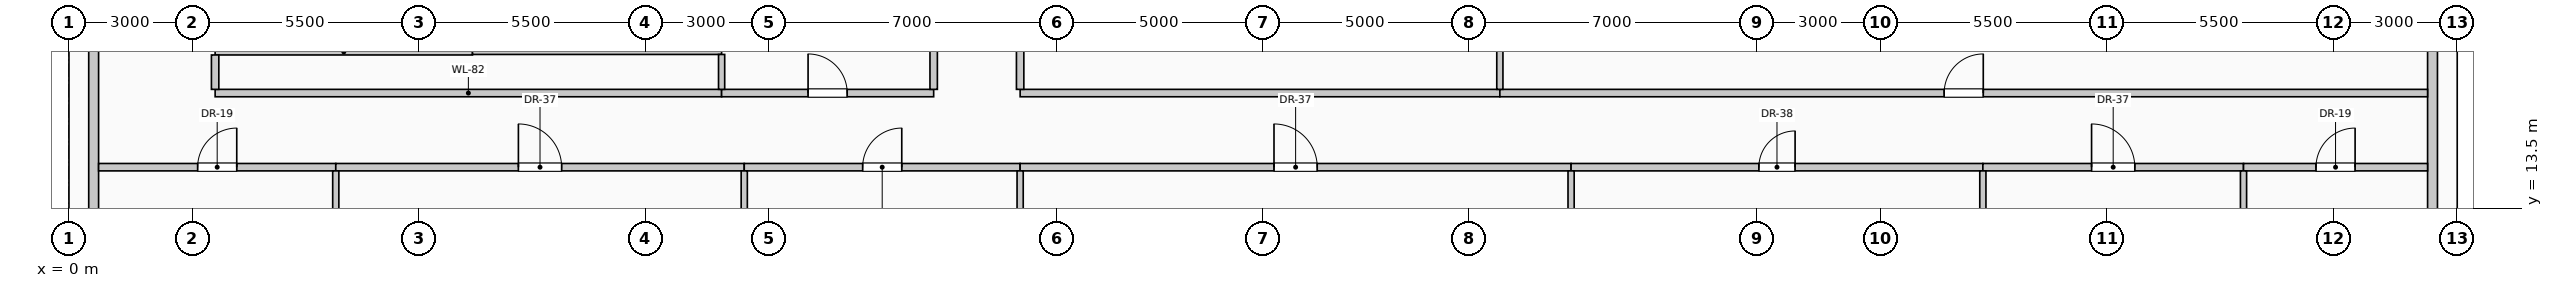
"""IFC4 building model, lengths in metres.
Left out: names, types, materials, properties, quantities, classifications, styles, units other than length and angle.
Written with IfcOpenShell. Run it as: python <this file> out.ifc"""

import sys

from ifc_helpers import new_model, si_unit, direction, frame, frame_2d, origin, place, context, subcontext, project, spatial, rectangle, extrude, element, fill, save


model = new_model("IFC4")
c1 = context("Model", 3, precision=1e-05, world=origin(), true_north=direction((0.0, 1.0)))
c2 = subcontext(c1, "Body", "Model", "MODEL_VIEW")
j1 = project(units=[si_unit("LENGTHUNIT", "METRE"), si_unit("PLANEANGLEUNIT", "RADIAN")], contexts=[c1])
p1 = place(None, origin())
s1 = spatial("IfcSite", under=j1, at=p1, CompositionType="ELEMENT")
p2 = place(p1, origin())
s2 = spatial("IfcBuilding", under=s1, at=p2, CompositionType="ELEMENT")
p3 = place(p2, frame((0.0, 0.0, 202.6)))
s3 = spatial("IfcBuildingStorey", under=s2, at=p3, CompositionType="ELEMENT", Elevation=202.6)
p4 = place(p3, frame((0.6, 10.42, 0.0), z_axis=(0.0, 0.0, 1.0), x_axis=(0.0, 1.0, 0.0)))
e1 = element("IfcWall", 1, at=p4, inside=s3, PredefinedType="SOLIDWALL", context=c2, shape_type="SweptSolid", body=[
    extrude(rectangle(XDim=7.16, YDim=0.24, at=frame_2d((3.58, 0.0))), origin(), (0.0, 0.0, 1.0), 3.0),
])
p5 = place(p4, frame((1.387, 0.0, 0.42)))
e2 = element("IfcOpeningElement", 2, at=p5, cuts=e1, PredefinedType="OPENING", context=c2, shape_type="SweptSolid", body=[
    extrude(rectangle(XDim=1.5, YDim=2.2, at=frame_2d((0.75, 1.1))), frame((0.0, 0.13, 0.0), z_axis=(0.0, -1.0, 0.0), x_axis=(1.0, 0.0, 0.0)), (0.0, 0.0, 1.0), 0.26),
])
p6 = place(p3, frame((57.4, 17.58, 0.0), z_axis=(0.0, 0.0, 1.0), x_axis=(0.0, -1.0, 0.0)))
e3 = element("IfcWall", 3, at=p6, inside=s3, PredefinedType="SOLIDWALL", context=c2, shape_type="SweptSolid", body=[
    extrude(rectangle(XDim=7.16, YDim=0.24, at=frame_2d((3.58, 0.0))), origin(), (0.0, 0.0, 1.0), 3.0),
])
p7 = place(p6, frame((4.273, 0.0, 0.42)))
e4 = element("IfcOpeningElement", 4, at=p7, cuts=e3, PredefinedType="OPENING", context=c2, shape_type="SweptSolid", body=[
    extrude(rectangle(XDim=1.5, YDim=2.2, at=frame_2d((0.75, 1.1))), frame((0.0, 0.13, 0.0), z_axis=(0.0, -1.0, 0.0), x_axis=(1.0, 0.0, 0.0)), (0.0, 0.0, 1.0), 0.26),
])
p8 = place(p3, frame((0.72, 14.5, 0.0), z_axis=(0.0, 0.0, 1.0), x_axis=(1.0, 0.0, 0.0)))
e5 = element("IfcWall", 5, at=p8, inside=s3, PredefinedType="PARTITIONING", context=c2, shape_type="SweptSolid", body=[
    extrude(rectangle(XDim=5.76, YDim=0.18, at=frame_2d((2.88, 0.0))), origin(), (0.0, 0.0, 1.0), 3.75),
])
p9 = place(p8, frame((2.405, 0.0, 0.0)))
e6 = element("IfcOpeningElement", 6, at=p9, cuts=e5, PredefinedType="OPENING", context=c2, shape_type="SweptSolid", body=[
    extrude(rectangle(XDim=0.95, YDim=2.15, at=frame_2d((0.475, 1.075))), frame((0.0, 0.1, 0.0), z_axis=(0.0, -1.0, 0.0), x_axis=(1.0, 0.0, 0.0)), (0.0, 0.0, 1.0), 0.2),
])
p10 = place(p3, frame((6.48, 14.5, 0.0), z_axis=(0.0, 0.0, 1.0), x_axis=(1.0, 0.0, 0.0)))
e7 = element("IfcWall", 7, at=p10, inside=s3, PredefinedType="PARTITIONING", context=c2, shape_type="SweptSolid", body=[
    extrude(rectangle(XDim=9.92, YDim=0.18, at=frame_2d((4.96, 0.0))), origin(), (0.0, 0.0, 1.0), 3.75),
])
p11 = place(p10, frame((4.435, 0.0, 0.0)))
e8 = element("IfcOpeningElement", 8, at=p11, cuts=e7, PredefinedType="OPENING", context=c2, shape_type="SweptSolid", body=[
    extrude(rectangle(XDim=1.05, YDim=2.15, at=frame_2d((0.525, 1.075))), frame((0.0, 0.1, 0.0), z_axis=(0.0, -1.0, 0.0), x_axis=(1.0, 0.0, 0.0)), (0.0, 0.0, 1.0), 0.2),
])
p12 = place(p3, frame((16.4, 14.5, 0.0), z_axis=(0.0, 0.0, 1.0), x_axis=(1.0, 0.0, 0.0)))
e9 = element("IfcWall", 9, at=p12, inside=s3, PredefinedType="PARTITIONING", context=c2, shape_type="SweptSolid", body=[
    extrude(rectangle(XDim=6.7, YDim=0.18, at=frame_2d((3.35, 0.0))), origin(), (0.0, 0.0, 1.0), 3.75),
])
p13 = place(p12, frame((2.875, 0.0, 0.0)))
e10 = element("IfcOpeningElement", 10, at=p13, cuts=e9, PredefinedType="OPENING", context=c2, shape_type="SweptSolid", body=[
    extrude(rectangle(XDim=0.95, YDim=2.15, at=frame_2d((0.475, 1.075))), frame((0.0, 0.1, 0.0), z_axis=(0.0, -1.0, 0.0), x_axis=(1.0, 0.0, 0.0)), (0.0, 0.0, 1.0), 0.2),
])
p14 = place(p3, frame((23.1, 14.5, 0.0), z_axis=(0.0, 0.0, 1.0), x_axis=(1.0, 0.0, 0.0)))
e11 = element("IfcWall", 11, at=p14, inside=s3, PredefinedType="PARTITIONING", context=c2, shape_type="SweptSolid", body=[
    extrude(rectangle(XDim=13.38, YDim=0.18, at=frame_2d((6.69, 0.0))), origin(), (0.0, 0.0, 1.0), 3.75),
])
p15 = place(p14, frame((6.165, 0.0, 0.0)))
e12 = element("IfcOpeningElement", 12, at=p15, cuts=e11, PredefinedType="OPENING", context=c2, shape_type="SweptSolid", body=[
    extrude(rectangle(XDim=1.05, YDim=2.15, at=frame_2d((0.525, 1.075))), frame((0.0, 0.1, 0.0), z_axis=(0.0, -1.0, 0.0), x_axis=(1.0, 0.0, 0.0)), (0.0, 0.0, 1.0), 0.2),
])
p16 = place(p3, frame((36.48, 14.5, 0.0), z_axis=(0.0, 0.0, 1.0), x_axis=(1.0, 0.0, 0.0)))
e13 = element("IfcWall", 13, at=p16, inside=s3, PredefinedType="PARTITIONING", context=c2, shape_type="SweptSolid", body=[
    extrude(rectangle(XDim=10.0, YDim=0.18, at=frame_2d((5.0, 0.0))), origin(), (0.0, 0.0, 1.0), 3.75),
])
p17 = place(p16, frame((4.56, 0.0, 0.0)))
e14 = element("IfcOpeningElement", 14, at=p17, cuts=e13, PredefinedType="OPENING", context=c2, shape_type="SweptSolid", body=[
    extrude(rectangle(XDim=0.88, YDim=2.1, at=frame_2d((0.44, 1.05))), frame((0.0, 0.1, 0.0), z_axis=(0.0, -1.0, 0.0), x_axis=(1.0, 0.0, 0.0)), (0.0, 0.0, 1.0), 0.2),
])
p18 = place(p3, frame((46.48, 14.5, 0.0), z_axis=(0.0, 0.0, 1.0), x_axis=(1.0, 0.0, 0.0)))
e15 = element("IfcWall", 15, at=p18, inside=s3, PredefinedType="PARTITIONING", context=c2, shape_type="SweptSolid", body=[
    extrude(rectangle(XDim=6.33, YDim=0.18, at=frame_2d((3.165, 0.0))), origin(), (0.0, 0.0, 1.0), 3.75),
])
p19 = place(p18, frame((2.64, 0.0, 0.0)))
e16 = element("IfcOpeningElement", 16, at=p19, cuts=e15, PredefinedType="OPENING", context=c2, shape_type="SweptSolid", body=[
    extrude(rectangle(XDim=1.05, YDim=2.15, at=frame_2d((0.525, 1.075))), frame((0.0, 0.1, 0.0), z_axis=(0.0, -1.0, 0.0), x_axis=(1.0, 0.0, 0.0)), (0.0, 0.0, 1.0), 0.2),
])
p20 = place(p3, frame((52.81, 14.5, 0.0), z_axis=(0.0, 0.0, 1.0), x_axis=(1.0, 0.0, 0.0)))
e17 = element("IfcWall", 17, at=p20, inside=s3, PredefinedType="PARTITIONING", context=c2, shape_type="SweptSolid", body=[
    extrude(rectangle(XDim=4.47, YDim=0.18, at=frame_2d((2.235, 0.0))), origin(), (0.0, 0.0, 1.0), 3.75),
])
p21 = place(p20, frame((1.76, 0.0, 0.0)))
e18 = element("IfcOpeningElement", 18, at=p21, cuts=e17, PredefinedType="OPENING", context=c2, shape_type="SweptSolid", body=[
    extrude(rectangle(XDim=0.95, YDim=2.15, at=frame_2d((0.475, 1.075))), frame((0.0, 0.1, 0.0), z_axis=(0.0, -1.0, 0.0), x_axis=(1.0, 0.0, 0.0)), (0.0, 0.0, 1.0), 0.2),
])
p22 = place(p3, frame((3.55, 16.3, 0.0), z_axis=(0.0, 0.0, 1.0), x_axis=(1.0, 0.0, 0.0)))
e19 = element("IfcWall", 19, at=p22, inside=s3, PredefinedType="PARTITIONING", context=c2, shape_type="SweptSolid", body=[
    extrude(rectangle(XDim=12.3, YDim=0.18, at=frame_2d((6.15, 0.0))), origin(), (0.0, 0.0, 1.0), 3.75),
])
p23 = place(p3, frame((15.85, 16.3, 0.0), z_axis=(0.0, 0.0, 1.0), x_axis=(1.0, 0.0, 0.0)))
e20 = element("IfcWall", 20, at=p23, inside=s3, PredefinedType="PARTITIONING", context=c2, shape_type="SweptSolid", body=[
    extrude(rectangle(XDim=5.15, YDim=0.18, at=frame_2d((2.575, 0.0))), origin(), (0.0, 0.0, 1.0), 3.75),
])
p24 = place(p23, frame((2.1, 0.0, 0.0)))
e21 = element("IfcOpeningElement", 21, at=p24, cuts=e20, PredefinedType="OPENING", context=c2, shape_type="SweptSolid", body=[
    extrude(rectangle(XDim=0.95, YDim=2.15, at=frame_2d((0.475, 1.075))), frame((0.0, 0.1, 0.0), z_axis=(0.0, -1.0, 0.0), x_axis=(1.0, 0.0, 0.0)), (0.0, 0.0, 1.0), 0.2),
])
p25 = place(p3, frame((23.1, 16.3, 0.0), z_axis=(0.0, 0.0, 1.0), x_axis=(1.0, 0.0, 0.0)))
e22 = element("IfcWall", 22, at=p25, inside=s3, PredefinedType="PARTITIONING", context=c2, shape_type="SweptSolid", body=[
    extrude(rectangle(XDim=11.65, YDim=0.18, at=frame_2d((5.825, 0.0))), origin(), (0.0, 0.0, 1.0), 3.75),
])
p26 = place(p3, frame((34.75, 16.3, 0.0), z_axis=(0.0, 0.0, 1.0), x_axis=(1.0, 0.0, 0.0)))
e23 = element("IfcWall", 23, at=p26, inside=s3, PredefinedType="PARTITIONING", context=c2, shape_type="SweptSolid", body=[
    extrude(rectangle(XDim=22.53, YDim=0.18, at=frame_2d((11.265, 0.0))), origin(), (0.0, 0.0, 1.0), 3.75),
])
p27 = place(p26, frame((10.79, 0.0, 0.0)))
e24 = element("IfcOpeningElement", 24, at=p27, cuts=e23, PredefinedType="OPENING", context=c2, shape_type="SweptSolid", body=[
    extrude(rectangle(XDim=0.95, YDim=2.15, at=frame_2d((0.475, 1.075))), frame((0.0, 0.1, 0.0), z_axis=(0.0, -1.0, 0.0), x_axis=(1.0, 0.0, 0.0)), (0.0, 0.0, 1.0), 0.2),
])
p28 = place(p3, frame((3.55, 17.3, 0.0), z_axis=(0.0, 0.0, 1.0), x_axis=(1.0, 0.0, 0.0)))
e25 = element("IfcWall", 25, at=p28, inside=s3, PredefinedType="PARTITIONING", context=c2, shape_type="SweptSolid", body=[
    extrude(rectangle(XDim=6.25, YDim=0.15, at=frame_2d((3.125, 0.0))), origin(), (0.0, 0.0, 1.0), 3.75),
])
p29 = place(p3, frame((9.8, 17.3, 0.0), z_axis=(0.0, 0.0, 1.0), x_axis=(1.0, 0.0, 0.0)))
e26 = element("IfcWall", 26, at=p29, inside=s3, PredefinedType="PARTITIONING", context=c2, shape_type="SweptSolid", body=[
    extrude(rectangle(XDim=6.05, YDim=0.125, at=frame_2d((3.025, 0.0))), origin(), (0.0, 0.0, 1.0), 3.75),
])
p30 = place(p3, frame((3.55, 16.39, 0.0), z_axis=(0.0, 0.0, 1.0), x_axis=(0.0, 1.0, 0.0)))
e27 = element("IfcWall", 27, at=p30, inside=s3, PredefinedType="PARTITIONING", context=c2, shape_type="SweptSolid", body=[
    extrude(rectangle(XDim=0.835, YDim=0.18, at=frame_2d((0.417, 0.0))), origin(), (0.0, 0.0, 1.0), 3.75),
])
p31 = place(p3, frame((6.48, 0.72, 0.0), z_axis=(0.0, 0.0, 1.0), x_axis=(0.0, 1.0, 0.0)))
e28 = element("IfcWall", 28, at=p31, inside=s3, PredefinedType="PARTITIONING", context=c2, shape_type="SweptSolid", body=[
    extrude(rectangle(XDim=13.69, YDim=0.15, at=frame_2d((6.845, 0.0))), origin(), (0.0, 0.0, 1.0), 3.75),
])
p32 = place(p3, frame((15.85, 16.39, 0.0), z_axis=(0.0, 0.0, 1.0), x_axis=(0.0, 1.0, 0.0)))
e29 = element("IfcWall", 29, at=p32, inside=s3, PredefinedType="PARTITIONING", context=c2, shape_type="SweptSolid", body=[
    extrude(rectangle(XDim=0.848, YDim=0.15, at=frame_2d((0.424, 0.0))), origin(), (0.0, 0.0, 1.0), 3.75),
])
p33 = place(p3, frame((16.4, 1.25, 0.0), z_axis=(0.0, 0.0, 1.0), x_axis=(0.0, 1.0, 0.0)))
e30 = element("IfcWall", 30, at=p33, inside=s3, PredefinedType="PARTITIONING", context=c2, shape_type="SweptSolid", body=[
    extrude(rectangle(XDim=13.16, YDim=0.15, at=frame_2d((6.58, 0.0))), origin(), (0.0, 0.0, 1.0), 3.145),
])
p34 = place(p3, frame((21.0, 16.39, 0.0), z_axis=(0.0, 0.0, 1.0), x_axis=(0.0, 1.0, 0.0)))
e31 = element("IfcWall", 31, at=p34, inside=s3, PredefinedType="PARTITIONING", context=c2, shape_type="SweptSolid", body=[
    extrude(rectangle(XDim=8.335, YDim=0.18, at=frame_2d((4.167, 0.0))), origin(), (0.0, 0.0, 1.0), 3.75),
])
p35 = place(p3, frame((23.1, 0.6, 0.0), z_axis=(0.0, 0.0, 1.0), x_axis=(0.0, 1.0, 0.0)))
e32 = element("IfcWall", 32, at=p35, inside=s3, PredefinedType="PARTITIONING", context=c2, shape_type="SweptSolid", body=[
    extrude(rectangle(XDim=13.81, YDim=0.15, at=frame_2d((6.905, 0.0))), origin(), (0.0, 0.0, 1.0), 3.75),
])
p36 = place(p3, frame((23.1, 16.39, 0.0), z_axis=(0.0, 0.0, 1.0), x_axis=(0.0, 1.0, 0.0)))
e33 = element("IfcWall", 33, at=p36, inside=s3, PredefinedType="PARTITIONING", context=c2, shape_type="SweptSolid", body=[
    extrude(rectangle(XDim=3.185, YDim=0.18, at=frame_2d((1.593, 0.0))), origin(), (0.0, 0.0, 1.0), 3.75),
])
p37 = place(p3, frame((34.75, 16.39, 0.0), z_axis=(0.0, 0.0, 1.0), x_axis=(0.0, 1.0, 0.0)))
e34 = element("IfcWall", 34, at=p37, inside=s3, PredefinedType="PARTITIONING", context=c2, shape_type="SweptSolid", body=[
    extrude(rectangle(XDim=3.185, YDim=0.15, at=frame_2d((1.593, 0.0))), origin(), (0.0, 0.0, 1.0), 3.75),
])
for number, where, z_axis, x_axis in (
    (35, (36.48, 0.72, 0.0), (0.0, 0.0, 1.0), (0.0, 1.0, 0.0)),
    (36, (46.48, 0.72, 0.0), (0.0, 0.0, 1.0), (0.0, 1.0, 0.0)),
    (37, (52.81, 0.72, 0.0), (0.0, 0.0, 1.0), (0.0, 1.0, 0.0)),
):
    element("IfcWall", number, at=place(p3, frame(where, z_axis=z_axis, x_axis=x_axis)), inside=s3, PredefinedType="PARTITIONING", context=c2, shape_type="SweptSolid", body=[
        extrude(rectangle(XDim=13.69, YDim=0.15, at=frame_2d((6.845, 0.0))), origin(), (0.0, 0.0, 1.0), 3.75),
    ])
p38 = place(p9, origin())
e38 = element("IfcDoor", 38, at=p38, inside=s3, OperationType="SINGLE_SWING_RIGHT", PredefinedType="DOOR", context=c2, shape_type="SweptSolid", body=[
    extrude(rectangle(XDim=0.95, YDim=2.15, at=frame_2d((0.475, 1.075))), frame((0.0, 0.025, 0.0), z_axis=(0.0, -1.0, 0.0), x_axis=(1.0, 0.0, 0.0)), (0.0, 0.0, 1.0), 0.05),
])
fill(e6, e38)
p39 = place(p11, origin())
e39 = element("IfcDoor", 39, at=p39, inside=s3, OperationType="SINGLE_SWING_LEFT", PredefinedType="DOOR", context=c2, shape_type="SweptSolid", body=[
    extrude(rectangle(XDim=1.05, YDim=2.15, at=frame_2d((0.525, 1.075))), frame((0.0, 0.025, 0.0), z_axis=(0.0, -1.0, 0.0), x_axis=(1.0, 0.0, 0.0)), (0.0, 0.0, 1.0), 0.05),
])
fill(e8, e39)
p40 = place(p13, origin())
e40 = element("IfcDoor", 40, at=p40, inside=s3, OperationType="SINGLE_SWING_RIGHT", PredefinedType="DOOR", context=c2, shape_type="SweptSolid", body=[
    extrude(rectangle(XDim=0.95, YDim=2.15, at=frame_2d((0.475, 1.075))), frame((0.0, 0.025, 0.0), z_axis=(0.0, -1.0, 0.0), x_axis=(1.0, 0.0, 0.0)), (0.0, 0.0, 1.0), 0.05),
])
fill(e10, e40)
p41 = place(p15, origin())
e41 = element("IfcDoor", 41, at=p41, inside=s3, OperationType="SINGLE_SWING_LEFT", PredefinedType="DOOR", context=c2, shape_type="SweptSolid", body=[
    extrude(rectangle(XDim=1.05, YDim=2.15, at=frame_2d((0.525, 1.075))), frame((0.0, 0.025, 0.0), z_axis=(0.0, -1.0, 0.0), x_axis=(1.0, 0.0, 0.0)), (0.0, 0.0, 1.0), 0.05),
])
fill(e12, e41)
p42 = place(p17, origin())
e42 = element("IfcDoor", 42, at=p42, inside=s3, OperationType="SINGLE_SWING_RIGHT", PredefinedType="DOOR", context=c2, shape_type="SweptSolid", body=[
    extrude(rectangle(XDim=0.88, YDim=2.1, at=frame_2d((0.44, 1.05))), frame((0.0, 0.025, 0.0), z_axis=(0.0, -1.0, 0.0), x_axis=(1.0, 0.0, 0.0)), (0.0, 0.0, 1.0), 0.05),
])
fill(e14, e42)
p43 = place(p19, origin())
e43 = element("IfcDoor", 43, at=p43, inside=s3, OperationType="SINGLE_SWING_LEFT", PredefinedType="DOOR", context=c2, shape_type="SweptSolid", body=[
    extrude(rectangle(XDim=1.05, YDim=2.15, at=frame_2d((0.525, 1.075))), frame((0.0, 0.025, 0.0), z_axis=(0.0, -1.0, 0.0), x_axis=(1.0, 0.0, 0.0)), (0.0, 0.0, 1.0), 0.05),
])
fill(e16, e43)
p44 = place(p21, origin())
e44 = element("IfcDoor", 44, at=p44, inside=s3, OperationType="SINGLE_SWING_RIGHT", PredefinedType="DOOR", context=c2, shape_type="SweptSolid", body=[
    extrude(rectangle(XDim=0.95, YDim=2.15, at=frame_2d((0.475, 1.075))), frame((0.0, 0.025, 0.0), z_axis=(0.0, -1.0, 0.0), x_axis=(1.0, 0.0, 0.0)), (0.0, 0.0, 1.0), 0.05),
])
fill(e18, e44)
p45 = place(p24, origin())
e45 = element("IfcDoor", 45, at=p45, inside=s3, OperationType="SINGLE_SWING_LEFT", PredefinedType="DOOR", context=c2, shape_type="SweptSolid", body=[
    extrude(rectangle(XDim=0.95, YDim=2.15, at=frame_2d((0.475, 1.075))), frame((0.0, 0.025, 0.0), z_axis=(0.0, -1.0, 0.0), x_axis=(1.0, 0.0, 0.0)), (0.0, 0.0, 1.0), 0.05),
])
fill(e21, e45)
p46 = place(p27, origin())
e46 = element("IfcDoor", 46, at=p46, inside=s3, OperationType="SINGLE_SWING_RIGHT", PredefinedType="DOOR", context=c2, shape_type="SweptSolid", body=[
    extrude(rectangle(XDim=0.95, YDim=2.15, at=frame_2d((0.475, 1.075))), frame((0.0, 0.025, 0.0), z_axis=(0.0, -1.0, 0.0), x_axis=(1.0, 0.0, 0.0)), (0.0, 0.0, 1.0), 0.05),
])
fill(e24, e46)
save(model, sys.argv[1])
